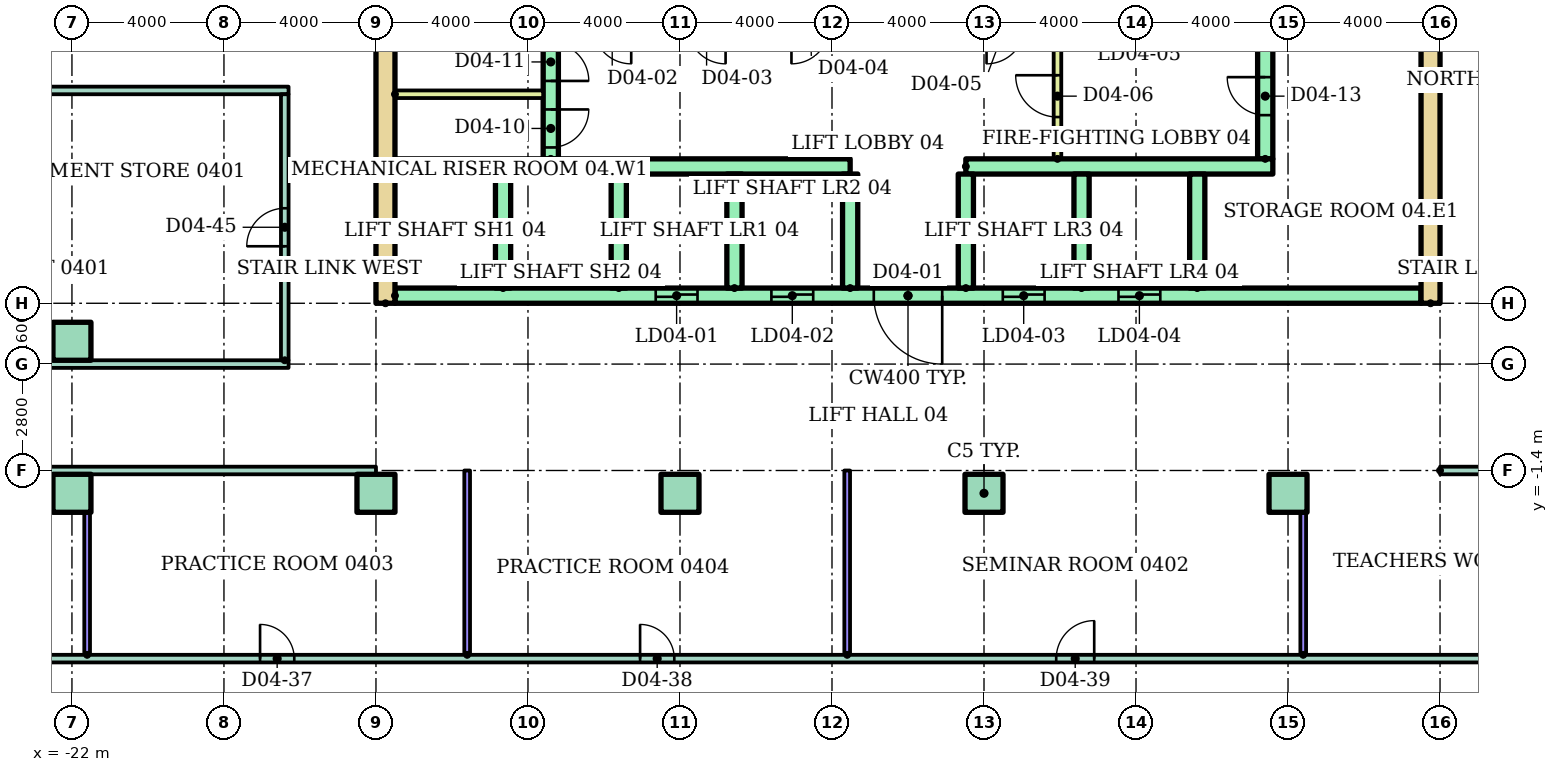
"""IFC4 building model, lengths in metres.
Left out: names, types, materials, properties, quantities, classifications, styles, units other than length and angle.
Written with IfcOpenShell. Run it as: python <this file> out.ifc"""

import sys

from ifc_helpers import new_model, si_unit, direction, frame, frame_2d, origin, origin_2d, place, context, subcontext, project, spatial, rectangle, extrude, element, fill, save


model = new_model("IFC4")
c1 = context("Model", 3, precision=1e-05, world=origin(), true_north=direction((0.0, 1.0)))
c2 = subcontext(c1, "Body", "Model", "MODEL_VIEW")
j1 = project(units=[si_unit("LENGTHUNIT", "METRE"), si_unit("PLANEANGLEUNIT", "RADIAN")], contexts=[c1])
p1 = place(None, origin())
s1 = spatial("IfcSite", under=j1, at=p1, CompositionType="ELEMENT")
p2 = place(p1, origin())
s2 = spatial("IfcBuilding", under=s1, at=p2, CompositionType="ELEMENT")
p3 = place(p2, frame((0.0, 0.0, 18.0)))
s3 = spatial("IfcBuildingStorey", under=s2, at=p3, CompositionType="ELEMENT", Elevation=18.0)
for number, where in (
    (1, (-22.0, -2.0, 0.0)),
    (2, (-14.0, -2.0, 0.0)),
    (3, (-6.0, -2.0, 0.0)),
    (4, (2.0, -2.0, 0.0)),
    (5, (10.0, -2.0, 0.0)),
    (6, (-22.0, 2.0, 0.0)),
):
    element("IfcColumn", number, at=place(p3, frame(where)), inside=s3, PredefinedType="COLUMN", context=c2, shape_type="SweptSolid", body=[
        extrude(rectangle(XDim=1.0, YDim=1.0, at=origin_2d()), origin(), (0.0, 0.0, 1.0), 4.0),
    ])
for number, where, z_axis, x_axis in (
    (7, (-13.75, 3.0, 0.0), (0.0, 0.0, 1.0), (0.0, 1.0, 0.0)),
    (8, (13.75, 3.0, 0.0), (0.0, 0.0, 1.0), (0.0, 1.0, 0.0)),
):
    element("IfcWall", number, at=place(p3, frame(where, z_axis=z_axis, x_axis=x_axis)), inside=s3, PredefinedType="SHEAR", context=c2, shape_type="SweptSolid", body=[
        extrude(rectangle(XDim=17.0, YDim=0.5, at=frame_2d((8.5, 0.0))), origin(), (0.0, 0.0, 1.0), 3.7),
    ])
p4 = place(p3, frame((-9.4, 6.8, 0.0), z_axis=(0.0, 0.0, 1.0), x_axis=(0.0, 1.0, 0.0)))
e9 = element("IfcWall", 9, at=p4, inside=s3, PredefinedType="SHEAR", context=c2, shape_type="SweptSolid", body=[
    extrude(rectangle(XDim=12.7, YDim=0.4, at=frame_2d((6.35, 0.0))), origin(), (0.0, 0.0, 1.0), 3.7),
])
p5 = place(p4, frame((0.3, 0.0, 0.0)))
e10 = element("IfcOpeningElement", 10, at=p5, cuts=e9, PredefinedType="OPENING", context=c2, shape_type="SweptSolid", body=[
    extrude(rectangle(XDim=1.0, YDim=2.1, at=frame_2d((0.5, 1.05))), frame((0.0, 0.21, 0.0), z_axis=(0.0, -1.0, 0.0), x_axis=(1.0, 0.0, 0.0)), (0.0, 0.0, 1.0), 0.42),
])
p6 = place(p4, frame((2.05, 0.0, 0.0)))
e11 = element("IfcOpeningElement", 11, at=p6, cuts=e9, PredefinedType="OPENING", context=c2, shape_type="SweptSolid", body=[
    extrude(rectangle(XDim=1.0, YDim=2.1, at=frame_2d((0.5, 1.05))), frame((0.0, 0.21, 0.0), z_axis=(0.0, -1.0, 0.0), x_axis=(1.0, 0.0, 0.0)), (0.0, 0.0, 1.0), 0.42),
])
p7 = place(p4, frame((7.925, 0.0, 0.0)))
e12 = element("IfcOpeningElement", 12, at=p7, cuts=e9, PredefinedType="OPENING", context=c2, shape_type="SweptSolid", body=[
    extrude(rectangle(XDim=1.0, YDim=2.1, at=frame_2d((0.5, 1.05))), frame((0.0, 0.21, 0.0), z_axis=(0.0, -1.0, 0.0), x_axis=(1.0, 0.0, 0.0)), (0.0, 0.0, 1.0), 0.42),
])
p8 = place(p3, frame((9.4, 6.8, 0.0), z_axis=(0.0, 0.0, 1.0), x_axis=(0.0, 1.0, 0.0)))
e13 = element("IfcWall", 13, at=p8, inside=s3, PredefinedType="SHEAR", context=c2, shape_type="SweptSolid", body=[
    extrude(rectangle(XDim=12.7, YDim=0.4, at=frame_2d((6.35, 0.0))), origin(), (0.0, 0.0, 1.0), 3.7),
])
p9 = place(p8, frame((1.15, 0.0, 0.0)))
e14 = element("IfcOpeningElement", 14, at=p9, cuts=e13, PredefinedType="OPENING", context=c2, shape_type="SweptSolid", body=[
    extrude(rectangle(XDim=1.0, YDim=2.1, at=frame_2d((0.5, 1.05))), frame((0.0, 0.21, 0.0), z_axis=(0.0, -1.0, 0.0), x_axis=(1.0, 0.0, 0.0)), (0.0, 0.0, 1.0), 0.42),
])
p10 = place(p8, frame((7.925, 0.0, 0.0)))
e15 = element("IfcOpeningElement", 15, at=p10, cuts=e13, PredefinedType="OPENING", context=c2, shape_type="SweptSolid", body=[
    extrude(rectangle(XDim=1.0, YDim=2.1, at=frame_2d((0.5, 1.05))), frame((0.0, 0.21, 0.0), z_axis=(0.0, -1.0, 0.0), x_axis=(1.0, 0.0, 0.0)), (0.0, 0.0, 1.0), 0.42),
])
p11 = place(p3, frame((-13.5, 3.2, 0.0)))
e16 = element("IfcWall", 16, at=p11, inside=s3, PredefinedType="SHEAR", context=c2, shape_type="SweptSolid", body=[
    extrude(rectangle(XDim=27.0, YDim=0.4, at=frame_2d((13.5, 0.0))), origin(), (0.0, 0.0, 1.0), 3.7),
])
p12 = place(p11, frame((6.861, 0.0, 0.0)))
e17 = element("IfcOpeningElement", 17, at=p12, cuts=e16, PredefinedType="OPENING", context=c2, shape_type="SweptSolid", body=[
    extrude(rectangle(XDim=1.1, YDim=2.1, at=frame_2d((0.55, 1.05))), frame((0.0, 0.21, 0.0), z_axis=(0.0, -1.0, 0.0), x_axis=(1.0, 0.0, 0.0)), (0.0, 0.0, 1.0), 0.42),
])
p13 = place(p11, frame((9.906, 0.0, 0.0)))
e18 = element("IfcOpeningElement", 18, at=p13, cuts=e16, PredefinedType="OPENING", context=c2, shape_type="SweptSolid", body=[
    extrude(rectangle(XDim=1.1, YDim=2.1, at=frame_2d((0.55, 1.05))), frame((0.0, 0.21, 0.0), z_axis=(0.0, -1.0, 0.0), x_axis=(1.0, 0.0, 0.0)), (0.0, 0.0, 1.0), 0.42),
])
p14 = place(p11, frame((15.994, 0.0, 0.0)))
e19 = element("IfcOpeningElement", 19, at=p14, cuts=e16, PredefinedType="OPENING", context=c2, shape_type="SweptSolid", body=[
    extrude(rectangle(XDim=1.1, YDim=2.1, at=frame_2d((0.55, 1.05))), frame((0.0, 0.21, 0.0), z_axis=(0.0, -1.0, 0.0), x_axis=(1.0, 0.0, 0.0)), (0.0, 0.0, 1.0), 0.42),
])
p15 = place(p11, frame((19.039, 0.0, 0.0)))
e20 = element("IfcOpeningElement", 20, at=p15, cuts=e16, PredefinedType="OPENING", context=c2, shape_type="SweptSolid", body=[
    extrude(rectangle(XDim=1.1, YDim=2.1, at=frame_2d((0.55, 1.05))), frame((0.0, 0.21, 0.0), z_axis=(0.0, -1.0, 0.0), x_axis=(1.0, 0.0, 0.0)), (0.0, 0.0, 1.0), 0.42),
])
p16 = place(p11, frame((12.6, 0.0, 0.0)))
e21 = element("IfcOpeningElement", 21, at=p16, cuts=e16, PredefinedType="OPENING", context=c2, shape_type="SweptSolid", body=[
    extrude(rectangle(XDim=1.8, YDim=2.1, at=frame_2d((0.9, 1.05))), frame((0.0, 0.21, 0.0), z_axis=(0.0, -1.0, 0.0), x_axis=(1.0, 0.0, 0.0)), (0.0, 0.0, 1.0), 0.42),
])
p17 = place(p3, frame((-13.5, 6.6, 0.0)))
e22 = element("IfcWall", 22, at=p17, inside=s3, PredefinedType="SHEAR", context=c2, shape_type="SweptSolid", body=[
    extrude(rectangle(XDim=11.978, YDim=0.4, at=frame_2d((5.989, 0.0))), origin(), (0.0, 0.0, 1.0), 3.7),
])
p18 = place(p3, frame((1.522, 6.6, 0.0)))
e23 = element("IfcWall", 23, at=p18, inside=s3, PredefinedType="SHEAR", context=c2, shape_type="SweptSolid", body=[
    extrude(rectangle(XDim=8.078, YDim=0.4, at=frame_2d((4.039, 0.0))), origin(), (0.0, 0.0, 1.0), 3.7),
])
for number, where, z_axis, x_axis in (
    (24, (-10.656, 3.4, 0.0), (0.0, 0.0, 1.0), (0.0, 1.0, 0.0)),
    (25, (-7.611, 3.4, 0.0), (0.0, 0.0, 1.0), (0.0, 1.0, 0.0)),
    (26, (-4.567, 3.4, 0.0), (0.0, 0.0, 1.0), (0.0, 1.0, 0.0)),
    (27, (-1.522, 3.4, 0.0), (0.0, 0.0, 1.0), (0.0, 1.0, 0.0)),
    (28, (1.522, 3.4, 0.0), (0.0, 0.0, 1.0), (0.0, 1.0, 0.0)),
    (29, (4.567, 3.4, 0.0), (0.0, 0.0, 1.0), (0.0, 1.0, 0.0)),
    (30, (7.611, 3.4, 0.0), (0.0, 0.0, 1.0), (0.0, 1.0, 0.0)),
):
    element("IfcWall", number, at=place(p3, frame(where, z_axis=z_axis, x_axis=x_axis)), inside=s3, PredefinedType="SHEAR", context=c2, shape_type="SweptSolid", body=[
        extrude(rectangle(XDim=3.0, YDim=0.4, at=frame_2d((1.5, 0.0))), origin(), (0.0, 0.0, 1.0), 3.7),
    ])
p19 = place(p3, frame((3.933, 6.8, 0.0), z_axis=(0.0, 0.0, 1.0), x_axis=(0.0, 1.0, 0.0)))
e31 = element("IfcWall", 31, at=p19, inside=s3, PredefinedType="PARTITIONING", context=c2, shape_type="SweptSolid", body=[
    extrude(rectangle(XDim=3.3, YDim=0.2, at=frame_2d((1.65, 0.0))), origin(), (0.0, 0.0, 1.0), 3.7),
])
p20 = place(p19, frame((1.1, 0.0, 0.0)))
e32 = element("IfcOpeningElement", 32, at=p20, cuts=e31, PredefinedType="OPENING", context=c2, shape_type="SweptSolid", body=[
    extrude(rectangle(XDim=1.1, YDim=2.1, at=frame_2d((0.55, 1.05))), frame((0.0, 0.11, 0.0), z_axis=(0.0, -1.0, 0.0), x_axis=(1.0, 0.0, 0.0)), (0.0, 0.0, 1.0), 0.22),
])
p21 = place(p3, frame((-13.5, 8.5, 0.0)))
e33 = element("IfcWall", 33, at=p21, inside=s3, PredefinedType="PARTITIONING", context=c2, shape_type="SweptSolid", body=[
    extrude(rectangle(XDim=3.9, YDim=0.2, at=frame_2d((1.95, 0.0))), origin(), (0.0, 0.0, 1.0), 3.7),
])
p22 = place(p3, frame((-37.6, -6.35, 0.0)))
e34 = element("IfcWall", 34, at=p22, inside=s3, PredefinedType="PARTITIONING", context=c2, shape_type="SweptSolid", body=[
    extrude(rectangle(XDim=75.2, YDim=0.2, at=frame_2d((37.6, 0.0))), origin(), (0.0, 0.0, 1.0), 3.7),
])
p23 = place(p22, frame((7.5, 0.0, 0.0)))
e35 = element("IfcOpeningElement", 35, at=p23, cuts=e34, PredefinedType="OPENING", context=c2, shape_type="SweptSolid", body=[
    extrude(rectangle(XDim=1.0, YDim=2.1, at=frame_2d((0.5, 1.05))), frame((0.0, 0.11, 0.0), z_axis=(0.0, -1.0, 0.0), x_axis=(1.0, 0.0, 0.0)), (0.0, 0.0, 1.0), 0.22),
])
p24 = place(p22, frame((20.55, 0.0, 0.0)))
e36 = element("IfcOpeningElement", 36, at=p24, cuts=e34, PredefinedType="OPENING", context=c2, shape_type="SweptSolid", body=[
    extrude(rectangle(XDim=0.9, YDim=2.1, at=frame_2d((0.45, 1.05))), frame((0.0, 0.11, 0.0), z_axis=(0.0, -1.0, 0.0), x_axis=(1.0, 0.0, 0.0)), (0.0, 0.0, 1.0), 0.22),
])
p25 = place(p22, frame((30.55, 0.0, 0.0)))
e37 = element("IfcOpeningElement", 37, at=p25, cuts=e34, PredefinedType="OPENING", context=c2, shape_type="SweptSolid", body=[
    extrude(rectangle(XDim=0.9, YDim=2.1, at=frame_2d((0.45, 1.05))), frame((0.0, 0.11, 0.0), z_axis=(0.0, -1.0, 0.0), x_axis=(1.0, 0.0, 0.0)), (0.0, 0.0, 1.0), 0.22),
])
p26 = place(p22, frame((41.5, 0.0, 0.0)))
e38 = element("IfcOpeningElement", 38, at=p26, cuts=e34, PredefinedType="OPENING", context=c2, shape_type="SweptSolid", body=[
    extrude(rectangle(XDim=1.0, YDim=2.1, at=frame_2d((0.5, 1.05))), frame((0.0, 0.11, 0.0), z_axis=(0.0, -1.0, 0.0), x_axis=(1.0, 0.0, 0.0)), (0.0, 0.0, 1.0), 0.22),
])
p27 = place(p22, frame((61.1, 0.0, 0.0)))
e39 = element("IfcOpeningElement", 39, at=p27, cuts=e34, PredefinedType="OPENING", context=c2, shape_type="SweptSolid", body=[
    extrude(rectangle(XDim=1.0, YDim=2.1, at=frame_2d((0.5, 1.05))), frame((0.0, 0.11, 0.0), z_axis=(0.0, -1.0, 0.0), x_axis=(1.0, 0.0, 0.0)), (0.0, 0.0, 1.0), 0.22),
])
for number, where in (
    (40, (-36.9, -1.4, 0.0)),
    (41, (14.0, -1.4, 0.0)),
):
    element("IfcWall", number, at=place(p3, frame(where)), inside=s3, PredefinedType="PARTITIONING", context=c2, shape_type="SweptSolid", body=[
        extrude(rectangle(XDim=22.9, YDim=0.2, at=frame_2d((11.45, 0.0))), origin(), (0.0, 0.0, 1.0), 3.7),
    ])
p28 = place(p3, frame((-36.9, 1.4, 0.0)))
e42 = element("IfcWall", 42, at=p28, inside=s3, PredefinedType="PARTITIONING", context=c2, shape_type="SweptSolid", body=[
    extrude(rectangle(XDim=20.6, YDim=0.2, at=frame_2d((10.3, 0.0))), origin(), (0.0, 0.0, 1.0), 3.7),
])
p29 = place(p28, frame((1.3, 0.0, 0.0)))
e43 = element("IfcOpeningElement", 43, at=p29, cuts=e42, PredefinedType="OPENING", context=c2, shape_type="SweptSolid", body=[
    extrude(rectangle(XDim=1.0, YDim=2.1, at=frame_2d((0.5, 1.05))), frame((0.0, 0.11, 0.0), z_axis=(0.0, -1.0, 0.0), x_axis=(1.0, 0.0, 0.0)), (0.0, 0.0, 1.0), 0.22),
])
p30 = place(p28, frame((5.25, 0.0, 0.0)))
e44 = element("IfcOpeningElement", 44, at=p30, cuts=e42, PredefinedType="OPENING", context=c2, shape_type="SweptSolid", body=[
    extrude(rectangle(XDim=1.0, YDim=2.1, at=frame_2d((0.5, 1.05))), frame((0.0, 0.11, 0.0), z_axis=(0.0, -1.0, 0.0), x_axis=(1.0, 0.0, 0.0)), (0.0, 0.0, 1.0), 0.22),
])
p31 = place(p28, frame((10.0, 0.0, 0.0)))
e45 = element("IfcOpeningElement", 45, at=p31, cuts=e42, PredefinedType="OPENING", context=c2, shape_type="SweptSolid", body=[
    extrude(rectangle(XDim=1.0, YDim=2.1, at=frame_2d((0.5, 1.05))), frame((0.0, 0.11, 0.0), z_axis=(0.0, -1.0, 0.0), x_axis=(1.0, 0.0, 0.0)), (0.0, 0.0, 1.0), 0.22),
])
p32 = place(p28, frame((12.35, 0.0, 0.0)))
e46 = element("IfcOpeningElement", 46, at=p32, cuts=e42, PredefinedType="OPENING", context=c2, shape_type="SweptSolid", body=[
    extrude(rectangle(XDim=0.9, YDim=2.1, at=frame_2d((0.45, 1.05))), frame((0.0, 0.11, 0.0), z_axis=(0.0, -1.0, 0.0), x_axis=(1.0, 0.0, 0.0)), (0.0, 0.0, 1.0), 0.22),
])
p33 = place(p3, frame((-37.6, 8.6, 0.0)))
e47 = element("IfcWall", 47, at=p33, inside=s3, PredefinedType="PARTITIONING", context=c2, shape_type="SweptSolid", body=[
    extrude(rectangle(XDim=21.3, YDim=0.2, at=frame_2d((10.65, 0.0))), origin(), (0.0, 0.0, 1.0), 3.7),
])
p34 = place(p3, frame((-21.6, -6.25, 0.0), z_axis=(0.0, 0.0, 1.0), x_axis=(0.0, 1.0, 0.0)))
e48 = element("IfcWall", 48, at=p34, inside=s3, PredefinedType="PARTITIONING", context=c2, shape_type="SweptSolid", body=[
    extrude(rectangle(XDim=3.75, YDim=0.15, at=frame_2d((1.875, 0.0))), origin(), (0.0, 0.0, 1.0), 3.7),
])
p35 = place(p3, frame((-16.4, 1.5, 0.0), z_axis=(0.0, 0.0, 1.0), x_axis=(0.0, 1.0, 0.0)))
e49 = element("IfcWall", 49, at=p35, inside=s3, PredefinedType="PARTITIONING", context=c2, shape_type="SweptSolid", body=[
    extrude(rectangle(XDim=7.0, YDim=0.2, at=frame_2d((3.5, 0.0))), origin(), (0.0, 0.0, 1.0), 3.7),
])
p36 = place(p35, frame((3.0, 0.0, 0.0)))
e50 = element("IfcOpeningElement", 50, at=p36, cuts=e49, PredefinedType="OPENING", context=c2, shape_type="SweptSolid", body=[
    extrude(rectangle(XDim=1.0, YDim=2.1, at=frame_2d((0.5, 1.05))), frame((0.0, 0.11, 0.0), z_axis=(0.0, -1.0, 0.0), x_axis=(1.0, 0.0, 0.0)), (0.0, 0.0, 1.0), 0.22),
])
for number, where, z_axis, x_axis in (
    (51, (-11.6, -6.25, 0.0), (0.0, 0.0, 1.0), (0.0, 1.0, 0.0)),
    (52, (-1.6, -6.25, 0.0), (0.0, 0.0, 1.0), (0.0, 1.0, 0.0)),
):
    element("IfcWall", number, at=place(p3, frame(where, z_axis=z_axis, x_axis=x_axis)), inside=s3, PredefinedType="PARTITIONING", context=c2, shape_type="SweptSolid", body=[
        extrude(rectangle(XDim=4.85, YDim=0.15, at=frame_2d((2.425, 0.0))), origin(), (0.0, 0.0, 1.0), 3.7),
    ])
p37 = place(p3, frame((10.4, -6.25, 0.0), z_axis=(0.0, 0.0, 1.0), x_axis=(0.0, 1.0, 0.0)))
e53 = element("IfcWall", 53, at=p37, inside=s3, PredefinedType="PARTITIONING", context=c2, shape_type="SweptSolid", body=[
    extrude(rectangle(XDim=3.75, YDim=0.15, at=frame_2d((1.875, 0.0))), origin(), (0.0, 0.0, 1.0), 3.7),
])
p38 = place(p12, origin())
e54 = element("IfcDoor", 54, at=p38, inside=s3, OperationType="SLIDING_TO_LEFT", PredefinedType="DOOR", context=c2, shape_type="SweptSolid", body=[
    extrude(rectangle(XDim=1.1, YDim=2.1, at=frame_2d((0.55, 1.05))), frame((0.0, 0.025, 0.0), z_axis=(0.0, -1.0, 0.0), x_axis=(1.0, 0.0, 0.0)), (0.0, 0.0, 1.0), 0.05),
])
fill(e17, e54)
p39 = place(p13, origin())
e55 = element("IfcDoor", 55, at=p39, inside=s3, OperationType="SLIDING_TO_LEFT", PredefinedType="DOOR", context=c2, shape_type="SweptSolid", body=[
    extrude(rectangle(XDim=1.1, YDim=2.1, at=frame_2d((0.55, 1.05))), frame((0.0, 0.025, 0.0), z_axis=(0.0, -1.0, 0.0), x_axis=(1.0, 0.0, 0.0)), (0.0, 0.0, 1.0), 0.05),
])
fill(e18, e55)
p40 = place(p14, origin())
e56 = element("IfcDoor", 56, at=p40, inside=s3, OperationType="SLIDING_TO_LEFT", PredefinedType="DOOR", context=c2, shape_type="SweptSolid", body=[
    extrude(rectangle(XDim=1.1, YDim=2.1, at=frame_2d((0.55, 1.05))), frame((0.0, 0.025, 0.0), z_axis=(0.0, -1.0, 0.0), x_axis=(1.0, 0.0, 0.0)), (0.0, 0.0, 1.0), 0.05),
])
fill(e19, e56)
p41 = place(p15, origin())
e57 = element("IfcDoor", 57, at=p41, inside=s3, OperationType="SLIDING_TO_LEFT", PredefinedType="DOOR", context=c2, shape_type="SweptSolid", body=[
    extrude(rectangle(XDim=1.1, YDim=2.1, at=frame_2d((0.55, 1.05))), frame((0.0, 0.025, 0.0), z_axis=(0.0, -1.0, 0.0), x_axis=(1.0, 0.0, 0.0)), (0.0, 0.0, 1.0), 0.05),
])
fill(e20, e57)
p42 = place(p16, frame((1.8, 0.0, 0.0), z_axis=(0.0, 0.0, 1.0), x_axis=(-1.0, 0.0, 0.0)))
e58 = element("IfcDoor", 58, at=p42, inside=s3, OperationType="DOUBLE_DOOR_SINGLE_SWING", PredefinedType="DOOR", context=c2, shape_type="SweptSolid", body=[
    extrude(rectangle(XDim=1.8, YDim=2.1, at=frame_2d((0.9, 1.05))), frame((0.0, 0.025, 0.0), z_axis=(0.0, -1.0, 0.0), x_axis=(1.0, 0.0, 0.0)), (0.0, 0.0, 1.0), 0.05),
])
fill(e21, e58)
p43 = place(p20, origin())
e59 = element("IfcDoor", 59, at=p43, inside=s3, OperationType="SINGLE_SWING_RIGHT", PredefinedType="DOOR", context=c2, shape_type="SweptSolid", body=[
    extrude(rectangle(XDim=1.1, YDim=2.1, at=frame_2d((0.55, 1.05))), frame((0.0, 0.025, 0.0), z_axis=(0.0, -1.0, 0.0), x_axis=(1.0, 0.0, 0.0)), (0.0, 0.0, 1.0), 0.05),
])
fill(e32, e59)
p44 = place(p5, frame((1.0, 0.0, 0.0), z_axis=(0.0, 0.0, 1.0), x_axis=(-1.0, 0.0, 0.0)))
e60 = element("IfcDoor", 60, at=p44, inside=s3, OperationType="SINGLE_SWING_RIGHT", PredefinedType="DOOR", context=c2, shape_type="SweptSolid", body=[
    extrude(rectangle(XDim=1.0, YDim=2.1, at=frame_2d((0.5, 1.05))), frame((0.0, 0.025, 0.0), z_axis=(0.0, -1.0, 0.0), x_axis=(1.0, 0.0, 0.0)), (0.0, 0.0, 1.0), 0.05),
])
fill(e10, e60)
p45 = place(p6, frame((1.0, 0.0, 0.0), z_axis=(0.0, 0.0, 1.0), x_axis=(-1.0, 0.0, 0.0)))
e61 = element("IfcDoor", 61, at=p45, inside=s3, OperationType="SINGLE_SWING_LEFT", PredefinedType="DOOR", context=c2, shape_type="SweptSolid", body=[
    extrude(rectangle(XDim=1.0, YDim=2.1, at=frame_2d((0.5, 1.05))), frame((0.0, 0.025, 0.0), z_axis=(0.0, -1.0, 0.0), x_axis=(1.0, 0.0, 0.0)), (0.0, 0.0, 1.0), 0.05),
])
fill(e11, e61)
p46 = place(p9, origin())
e62 = element("IfcDoor", 62, at=p46, inside=s3, OperationType="SINGLE_SWING_RIGHT", PredefinedType="DOOR", context=c2, shape_type="SweptSolid", body=[
    extrude(rectangle(XDim=1.0, YDim=2.1, at=frame_2d((0.5, 1.05))), frame((0.0, 0.025, 0.0), z_axis=(0.0, -1.0, 0.0), x_axis=(1.0, 0.0, 0.0)), (0.0, 0.0, 1.0), 0.05),
])
fill(e14, e62)
p47 = place(p24, origin())
e63 = element("IfcDoor", 63, at=p47, inside=s3, OperationType="SINGLE_SWING_LEFT", PredefinedType="DOOR", context=c2, shape_type="SweptSolid", body=[
    extrude(rectangle(XDim=0.9, YDim=2.1, at=frame_2d((0.45, 1.05))), frame((0.0, 0.025, 0.0), z_axis=(0.0, -1.0, 0.0), x_axis=(1.0, 0.0, 0.0)), (0.0, 0.0, 1.0), 0.05),
])
fill(e36, e63)
p48 = place(p25, origin())
e64 = element("IfcDoor", 64, at=p48, inside=s3, OperationType="SINGLE_SWING_LEFT", PredefinedType="DOOR", context=c2, shape_type="SweptSolid", body=[
    extrude(rectangle(XDim=0.9, YDim=2.1, at=frame_2d((0.45, 1.05))), frame((0.0, 0.025, 0.0), z_axis=(0.0, -1.0, 0.0), x_axis=(1.0, 0.0, 0.0)), (0.0, 0.0, 1.0), 0.05),
])
fill(e37, e64)
p49 = place(p26, origin())
e65 = element("IfcDoor", 65, at=p49, inside=s3, OperationType="SINGLE_SWING_RIGHT", PredefinedType="DOOR", context=c2, shape_type="SweptSolid", body=[
    extrude(rectangle(XDim=1.0, YDim=2.1, at=frame_2d((0.5, 1.05))), frame((0.0, 0.025, 0.0), z_axis=(0.0, -1.0, 0.0), x_axis=(1.0, 0.0, 0.0)), (0.0, 0.0, 1.0), 0.05),
])
fill(e38, e65)
p50 = place(p36, origin())
e66 = element("IfcDoor", 66, at=p50, inside=s3, OperationType="SINGLE_SWING_LEFT", PredefinedType="DOOR", context=c2, shape_type="SweptSolid", body=[
    extrude(rectangle(XDim=1.0, YDim=2.1, at=frame_2d((0.5, 1.05))), frame((0.0, 0.025, 0.0), z_axis=(0.0, -1.0, 0.0), x_axis=(1.0, 0.0, 0.0)), (0.0, 0.0, 1.0), 0.05),
])
fill(e50, e66)
save(model, sys.argv[1])
